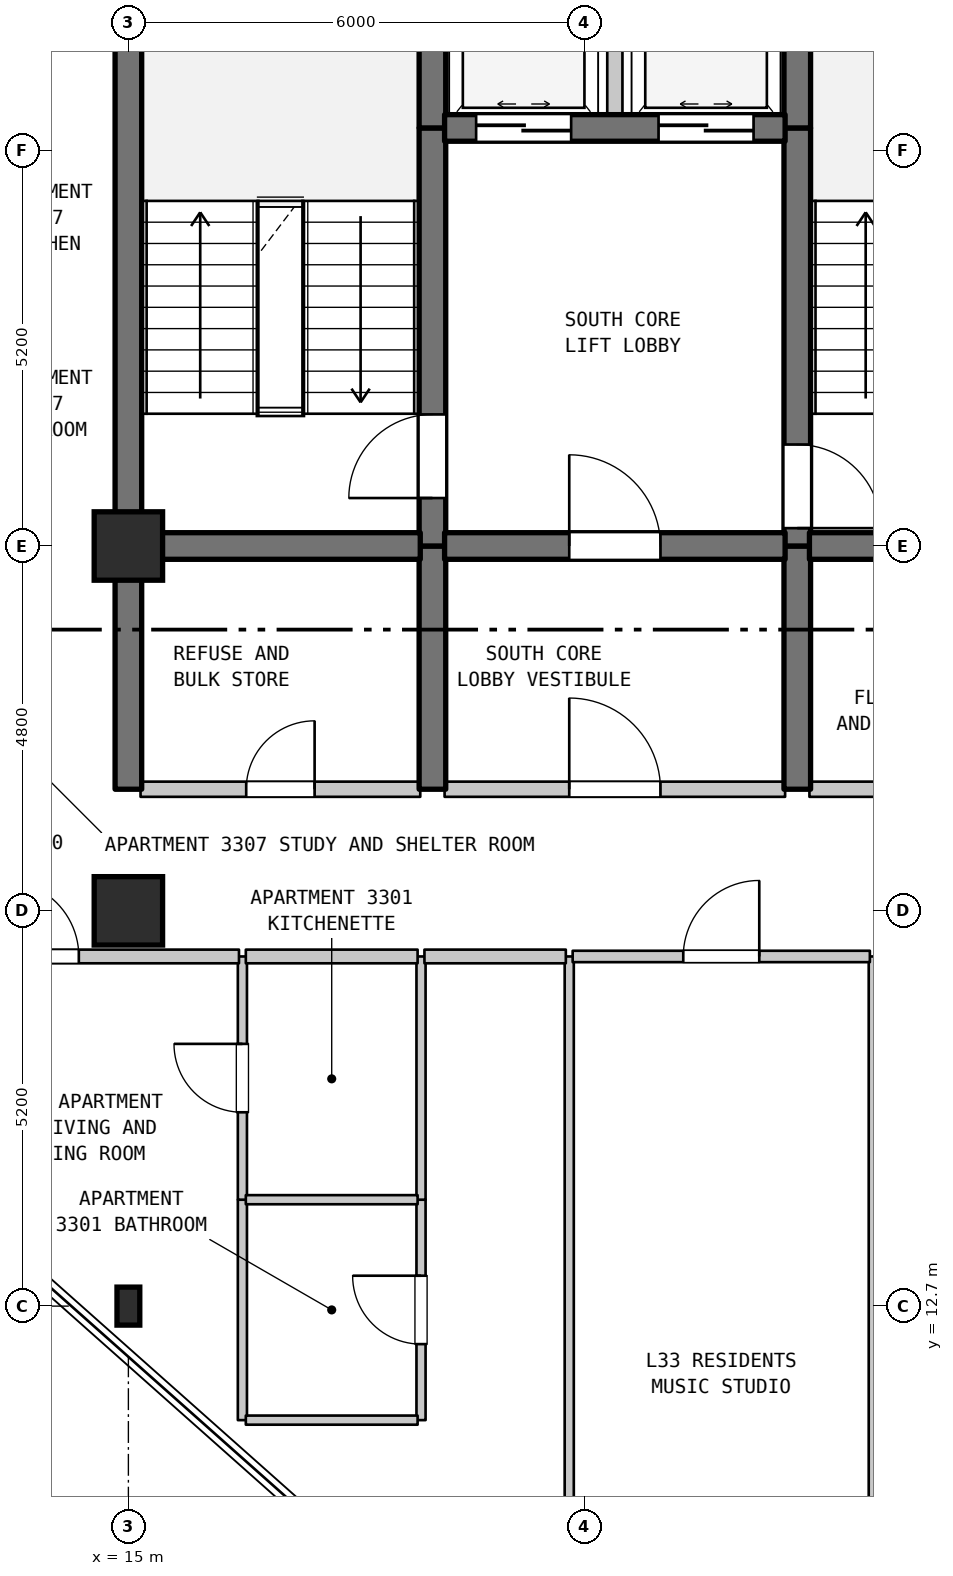
"""IFC4 building model, lengths in metres.
Left out: names, types, materials, properties, quantities, classifications, styles, units other than length and angle.
Written with IfcOpenShell. Run it as: python <this file> out.ifc"""

import sys

from ifc_helpers import new_model, si_unit, direction, frame, frame_2d, origin, origin_2d, place, context, subcontext, project, spatial, rectangle, i_section, extrude, element, fill, save


model = new_model("IFC4")
c1 = context("Model", 3, precision=1e-05, world=origin(), true_north=direction((0.0, 1.0)))
c2 = subcontext(c1, "Body", "Model", "MODEL_VIEW")
j1 = project(units=[si_unit("LENGTHUNIT", "METRE"), si_unit("PLANEANGLEUNIT", "RADIAN")], contexts=[c1])
p1 = place(None, origin())
s1 = spatial("IfcSite", under=j1, at=p1, CompositionType="ELEMENT")
p2 = place(p1, origin())
s2 = spatial("IfcBuilding", under=s1, at=p2, CompositionType="ELEMENT")
p3 = place(p2, frame((0.0, 0.0, 137.2)))
s3 = spatial("IfcBuildingStorey", under=s2, at=p3, CompositionType="ELEMENT", Elevation=137.2)
p4 = place(p3, frame((15.0, 12.7, 0.0), z_axis=(0.0, 0.0, 1.0), x_axis=(1.0, 0.0, 0.0)))
e1 = element("IfcColumn", 1, at=p4, inside=s3, PredefinedType="COLUMN", context=c2, shape_type="SweptSolid", body=[
    extrude(i_section(OverallWidth=0.3, OverallDepth=0.5, WebThickness=0.014, FlangeThickness=0.028, FilletRadius=0.027, at=origin_2d()), origin(), (0.0, 0.0, 1.0), 3.7),
])
for number, where, z_axis, x_axis in (
    (2, (15.0, 17.9, 0.0), (0.0, 0.0, 1.0), (1.0, 0.0, 0.0)),
    (3, (15.0, 22.7, 0.0), (0.0, 0.0, 1.0), (1.0, 0.0, 0.0)),
):
    element("IfcColumn", number, at=place(p3, frame(where, z_axis=z_axis, x_axis=x_axis)), inside=s3, PredefinedType="COLUMN", context=c2, shape_type="SweptSolid", body=[
        extrude(rectangle(XDim=0.9, YDim=0.9, at=origin_2d()), origin(), (0.0, 0.0, 1.0), 3.7),
    ])
p5 = place(p3, frame((15.0, 19.5, 0.0), z_axis=(0.0, 0.0, 1.0), x_axis=(0.0, 1.0, 0.0)))
e4 = element("IfcWall", 4, at=p5, inside=s3, PredefinedType="SHEAR", context=c2, shape_type="SweptSolid", body=[
    extrude(rectangle(XDim=3.2, YDim=0.35, at=frame_2d((1.6, 0.0))), origin(), (0.0, 0.0, 1.0), 3.385),
])
p6 = place(p3, frame((15.0, 22.7, 0.0), z_axis=(0.0, 0.0, 1.0), x_axis=(0.0, 1.0, 0.0)))
e5 = element("IfcWall", 5, at=p6, inside=s3, PredefinedType="SHEAR", context=c2, shape_type="SweptSolid", body=[
    extrude(rectangle(XDim=6.8, YDim=0.35, at=frame_2d((3.4, 0.0))), origin(), (0.0, 0.0, 1.0), 3.385),
])
p7 = place(p3, frame((16.5, 11.2, 0.0), z_axis=(0.0, 0.0, 1.0), x_axis=(0.0, 1.0, 0.0)))
e6 = element("IfcWall", 6, at=p7, inside=s3, PredefinedType="PARTITIONING", context=c2, shape_type="SweptSolid", body=[
    extrude(rectangle(XDim=2.9, YDim=0.12, at=frame_2d((1.45, 0.0))), origin(), (0.0, 0.0, 1.0), 3.385),
])
p8 = place(p3, frame((16.5, 14.1, 0.0), z_axis=(0.0, 0.0, 1.0), x_axis=(0.0, 1.0, 0.0)))
e7 = element("IfcWall", 7, at=p8, inside=s3, PredefinedType="PARTITIONING", context=c2, shape_type="SweptSolid", body=[
    extrude(rectangle(XDim=3.2, YDim=0.12, at=frame_2d((1.6, 0.0))), origin(), (0.0, 0.0, 1.0), 3.385),
])
p9 = place(p8, frame((1.15, 0.0, 0.0)))
e8 = element("IfcOpeningElement", 8, at=p9, cuts=e7, PredefinedType="OPENING", context=c2, shape_type="SweptSolid", body=[
    extrude(rectangle(XDim=0.9, YDim=2.15, at=frame_2d((0.45, 1.075))), frame((0.0, 0.07, 0.0), z_axis=(0.0, -1.0, 0.0), x_axis=(1.0, 0.0, 0.0)), (0.0, 0.0, 1.0), 0.14),
])
p10 = place(p3, frame((18.85, 11.2, 0.0), z_axis=(0.0, 0.0, 1.0), x_axis=(0.0, 1.0, 0.0)))
e9 = element("IfcWall", 9, at=p10, inside=s3, PredefinedType="PARTITIONING", context=c2, shape_type="SweptSolid", body=[
    extrude(rectangle(XDim=2.9, YDim=0.12, at=frame_2d((1.45, 0.0))), origin(), (0.0, 0.0, 1.0), 3.385),
])
p11 = place(p10, frame((1.0, 0.0, 0.0)))
e10 = element("IfcOpeningElement", 10, at=p11, cuts=e9, PredefinedType="OPENING", context=c2, shape_type="SweptSolid", body=[
    extrude(rectangle(XDim=0.9, YDim=2.1, at=frame_2d((0.45, 1.05))), frame((0.0, 0.07, 0.0), z_axis=(0.0, -1.0, 0.0), x_axis=(1.0, 0.0, 0.0)), (0.0, 0.0, 1.0), 0.14),
])
p12 = place(p3, frame((18.85, 14.1, 0.0), z_axis=(0.0, 0.0, 1.0), x_axis=(0.0, 1.0, 0.0)))
e11 = element("IfcWall", 11, at=p12, inside=s3, PredefinedType="PARTITIONING", context=c2, shape_type="SweptSolid", body=[
    extrude(rectangle(XDim=3.2, YDim=0.12, at=frame_2d((1.6, 0.0))), origin(), (0.0, 0.0, 1.0), 3.385),
])
p13 = place(p3, frame((19.0, 19.5, 0.0), z_axis=(0.0, 0.0, 1.0), x_axis=(0.0, 1.0, 0.0)))
e12 = element("IfcWall", 12, at=p13, inside=s3, PredefinedType="SHEAR", context=c2, shape_type="SweptSolid", body=[
    extrude(rectangle(XDim=3.2, YDim=0.35, at=frame_2d((1.6, 0.0))), origin(), (0.0, 0.0, 1.0), 3.385),
])
p14 = place(p3, frame((19.0, 22.7, 0.0), z_axis=(0.0, 0.0, 1.0), x_axis=(0.0, 1.0, 0.0)))
e13 = element("IfcWall", 13, at=p14, inside=s3, PredefinedType="SHEAR", context=c2, shape_type="SweptSolid", body=[
    extrude(rectangle(XDim=5.5, YDim=0.35, at=frame_2d((2.75, 0.0))), origin(), (0.0, 0.0, 1.0), 3.385),
])
p15 = place(p14, frame((0.631, 0.0, 0.0)))
e14 = element("IfcOpeningElement", 14, at=p15, cuts=e13, PredefinedType="OPENING", context=c2, shape_type="SweptSolid", body=[
    extrude(rectangle(XDim=1.1, YDim=2.15, at=frame_2d((0.55, 1.075))), frame((0.0, 0.185, 0.0), z_axis=(0.0, -1.0, 0.0), x_axis=(1.0, 0.0, 0.0)), (0.0, 0.0, 1.0), 0.37),
])
p16 = place(p3, frame((19.0, 28.2, 0.0), z_axis=(0.0, 0.0, 1.0), x_axis=(0.0, 1.0, 0.0)))
e15 = element("IfcWall", 15, at=p16, inside=s3, PredefinedType="SHEAR", context=c2, shape_type="SweptSolid", body=[
    extrude(rectangle(XDim=1.3, YDim=0.35, at=frame_2d((0.65, 0.0))), origin(), (0.0, 0.0, 1.0), 3.385),
])
p17 = place(p3, frame((20.8, 6.888, 0.0), z_axis=(0.0, 0.0, 1.0), x_axis=(0.0, 1.0, 0.0)))
e16 = element("IfcWall", 16, at=p17, inside=s3, PredefinedType="PARTITIONING", context=c2, shape_type="SweptSolid", body=[
    extrude(rectangle(XDim=10.412, YDim=0.12, at=frame_2d((5.206, 0.0))), origin(), (0.0, 0.0, 1.0), 3.385),
])
p18 = place(p3, frame((21.4, 28.2, 0.0), z_axis=(0.0, 0.0, 1.0), x_axis=(0.0, 1.0, 0.0)))
e17 = element("IfcWall", 17, at=p18, inside=s3, PredefinedType="STANDARD", context=c2, shape_type="SweptSolid", body=[
    extrude(rectangle(XDim=2.6, YDim=0.2, at=frame_2d((1.3, 0.0))), origin(), (0.0, 0.0, 1.0), 3.385),
])
p19 = place(p3, frame((23.8, 19.5, 0.0), z_axis=(0.0, 0.0, 1.0), x_axis=(0.0, 1.0, 0.0)))
e18 = element("IfcWall", 18, at=p19, inside=s3, PredefinedType="SHEAR", context=c2, shape_type="SweptSolid", body=[
    extrude(rectangle(XDim=3.2, YDim=0.35, at=frame_2d((1.6, 0.0))), origin(), (0.0, 0.0, 1.0), 3.385),
])
p20 = place(p3, frame((23.8, 22.7, 0.0), z_axis=(0.0, 0.0, 1.0), x_axis=(0.0, 1.0, 0.0)))
e19 = element("IfcWall", 19, at=p20, inside=s3, PredefinedType="SHEAR", context=c2, shape_type="SweptSolid", body=[
    extrude(rectangle(XDim=5.5, YDim=0.35, at=frame_2d((2.75, 0.0))), origin(), (0.0, 0.0, 1.0), 3.385),
])
p21 = place(p20, frame((0.235, 0.0, 0.0)))
e20 = element("IfcOpeningElement", 20, at=p21, cuts=e19, PredefinedType="OPENING", context=c2, shape_type="SweptSolid", body=[
    extrude(rectangle(XDim=1.1, YDim=2.15, at=frame_2d((0.55, 1.075))), frame((0.0, 0.185, 0.0), z_axis=(0.0, -1.0, 0.0), x_axis=(1.0, 0.0, 0.0)), (0.0, 0.0, 1.0), 0.37),
])
p22 = place(p3, frame((23.8, 28.2, 0.0), z_axis=(0.0, 0.0, 1.0), x_axis=(0.0, 1.0, 0.0)))
e21 = element("IfcWall", 21, at=p22, inside=s3, PredefinedType="SHEAR", context=c2, shape_type="SweptSolid", body=[
    extrude(rectangle(XDim=1.3, YDim=0.35, at=frame_2d((0.65, 0.0))), origin(), (0.0, 0.0, 1.0), 3.385),
])
p23 = place(p3, frame((24.8, 0.71, 0.0), z_axis=(0.0, 0.0, 1.0), x_axis=(0.0, 1.0, 0.0)))
e22 = element("IfcWall", 22, at=p23, inside=s3, PredefinedType="PARTITIONING", context=c2, shape_type="SweptSolid", body=[
    extrude(rectangle(XDim=16.59, YDim=0.12, at=frame_2d((8.295, 0.0))), origin(), (0.0, 0.0, 1.0), 3.385),
])
for number, where, z_axis, x_axis in (
    (23, (16.545, 11.2, 0.0), (0.0, 0.0, 1.0), (1.0, 0.0, 0.0)),
    (24, (16.545, 14.1, 0.0), (0.0, 0.0, 1.0), (1.0, 0.0, 0.0)),
):
    element("IfcWall", number, at=place(p3, frame(where, z_axis=z_axis, x_axis=x_axis)), inside=s3, PredefinedType="PARTITIONING", context=c2, shape_type="SweptSolid", body=[
        extrude(rectangle(XDim=2.26, YDim=0.12, at=frame_2d((1.13, 0.0))), origin(), (0.0, 0.0, 1.0), 3.385),
    ])
p24 = place(p3, frame((12.875, 17.3, 0.0), z_axis=(0.0, 0.0, 1.0), x_axis=(1.0, 0.0, 0.0)))
e25 = element("IfcWall", 25, at=p24, inside=s3, PredefinedType="STANDARD", context=c2, shape_type="SweptSolid", body=[
    extrude(rectangle(XDim=3.58, YDim=0.18, at=frame_2d((1.79, 0.0))), origin(), (0.0, 0.0, 1.0), 3.385),
])
p25 = place(p24, frame((0.473, 0.0, 0.0)))
e26 = element("IfcOpeningElement", 26, at=p25, cuts=e25, PredefinedType="OPENING", context=c2, shape_type="SweptSolid", body=[
    extrude(rectangle(XDim=1.0, YDim=2.15, at=frame_2d((0.5, 1.075))), frame((0.0, 0.1, 0.0), z_axis=(0.0, -1.0, 0.0), x_axis=(1.0, 0.0, 0.0)), (0.0, 0.0, 1.0), 0.2),
])
p26 = place(p3, frame((16.545, 17.3, 0.0), z_axis=(0.0, 0.0, 1.0), x_axis=(1.0, 0.0, 0.0)))
e27 = element("IfcWall", 27, at=p26, inside=s3, PredefinedType="STANDARD", context=c2, shape_type="SweptSolid", body=[
    extrude(rectangle(XDim=2.26, YDim=0.18, at=frame_2d((1.13, 0.0))), origin(), (0.0, 0.0, 1.0), 3.385),
])
p27 = place(p3, frame((18.895, 17.3, 0.0), z_axis=(0.0, 0.0, 1.0), x_axis=(1.0, 0.0, 0.0)))
e28 = element("IfcWall", 28, at=p27, inside=s3, PredefinedType="STANDARD", context=c2, shape_type="SweptSolid", body=[
    extrude(rectangle(XDim=1.86, YDim=0.18, at=frame_2d((0.93, 0.0))), origin(), (0.0, 0.0, 1.0), 3.385),
])
p28 = place(p3, frame((20.845, 17.3, 0.0), z_axis=(0.0, 0.0, 1.0), x_axis=(1.0, 0.0, 0.0)))
e29 = element("IfcWall", 29, at=p28, inside=s3, PredefinedType="STANDARD", context=c2, shape_type="SweptSolid", body=[
    extrude(rectangle(XDim=3.91, YDim=0.15, at=frame_2d((1.955, 0.0))), origin(), (0.0, 0.0, 1.0), 3.385),
])
p29 = place(p28, frame((1.455, 0.0, 0.0)))
e30 = element("IfcOpeningElement", 30, at=p29, cuts=e29, PredefinedType="OPENING", context=c2, shape_type="SweptSolid", body=[
    extrude(rectangle(XDim=1.0, YDim=2.15, at=frame_2d((0.5, 1.075))), frame((0.0, 0.085, 0.0), z_axis=(0.0, -1.0, 0.0), x_axis=(1.0, 0.0, 0.0)), (0.0, 0.0, 1.0), 0.17),
])
p30 = place(p3, frame((15.16, 19.5, 0.0), z_axis=(0.0, 0.0, 1.0), x_axis=(1.0, 0.0, 0.0)))
e31 = element("IfcWall", 31, at=p30, inside=s3, PredefinedType="STANDARD", context=c2, shape_type="SweptSolid", body=[
    extrude(rectangle(XDim=3.68, YDim=0.2, at=frame_2d((1.84, 0.0))), origin(), (0.0, 0.0, 1.0), 3.385),
])
p31 = place(p30, frame((1.39, 0.0, 0.0)))
e32 = element("IfcOpeningElement", 32, at=p31, cuts=e31, PredefinedType="OPENING", context=c2, shape_type="SweptSolid", body=[
    extrude(rectangle(XDim=0.9, YDim=2.15, at=frame_2d((0.45, 1.075))), frame((0.0, 0.11, 0.0), z_axis=(0.0, -1.0, 0.0), x_axis=(1.0, 0.0, 0.0)), (0.0, 0.0, 1.0), 0.22),
])
p32 = place(p3, frame((19.16, 19.5, 0.0), z_axis=(0.0, 0.0, 1.0), x_axis=(1.0, 0.0, 0.0)))
e33 = element("IfcWall", 33, at=p32, inside=s3, PredefinedType="STANDARD", context=c2, shape_type="SweptSolid", body=[
    extrude(rectangle(XDim=4.48, YDim=0.2, at=frame_2d((2.24, 0.0))), origin(), (0.0, 0.0, 1.0), 3.385),
])
p33 = place(p32, frame((1.64, 0.0, 0.0)))
e34 = element("IfcOpeningElement", 34, at=p33, cuts=e33, PredefinedType="OPENING", context=c2, shape_type="SweptSolid", body=[
    extrude(rectangle(XDim=1.2, YDim=2.2, at=frame_2d((0.6, 1.1))), frame((0.0, 0.11, 0.0), z_axis=(0.0, -1.0, 0.0), x_axis=(1.0, 0.0, 0.0)), (0.0, 0.0, 1.0), 0.22),
])
p34 = place(p3, frame((23.96, 19.5, 0.0), z_axis=(0.0, 0.0, 1.0), x_axis=(1.0, 0.0, 0.0)))
e35 = element("IfcWall", 35, at=p34, inside=s3, PredefinedType="STANDARD", context=c2, shape_type="SweptSolid", body=[
    extrude(rectangle(XDim=3.155, YDim=0.2, at=frame_2d((1.578, 0.0))), origin(), (0.0, 0.0, 1.0), 3.385),
])
p35 = place(p34, frame((0.991, 0.0, 0.0)))
e36 = element("IfcOpeningElement", 36, at=p35, cuts=e35, PredefinedType="OPENING", context=c2, shape_type="SweptSolid", body=[
    extrude(rectangle(XDim=0.95, YDim=2.15, at=frame_2d((0.475, 1.075))), frame((0.0, 0.11, 0.0), z_axis=(0.0, -1.0, 0.0), x_axis=(1.0, 0.0, 0.0)), (0.0, 0.0, 1.0), 0.22),
])
p36 = place(p3, frame((15.16, 22.7, 0.0), z_axis=(0.0, 0.0, 1.0), x_axis=(1.0, 0.0, 0.0)))
e37 = element("IfcWall", 37, at=p36, inside=s3, PredefinedType="SHEAR", context=c2, shape_type="SweptSolid", body=[
    extrude(rectangle(XDim=3.68, YDim=0.35, at=frame_2d((1.84, 0.0))), origin(), (0.0, 0.0, 1.0), 3.385),
])
p37 = place(p3, frame((19.16, 22.7, 0.0), z_axis=(0.0, 0.0, 1.0), x_axis=(1.0, 0.0, 0.0)))
e38 = element("IfcWall", 38, at=p37, inside=s3, PredefinedType="SHEAR", context=c2, shape_type="SweptSolid", body=[
    extrude(rectangle(XDim=4.48, YDim=0.35, at=frame_2d((2.24, 0.0))), origin(), (0.0, 0.0, 1.0), 3.385),
])
p38 = place(p37, frame((1.64, 0.0, 0.0)))
e39 = element("IfcOpeningElement", 39, at=p38, cuts=e38, PredefinedType="OPENING", context=c2, shape_type="SweptSolid", body=[
    extrude(rectangle(XDim=1.2, YDim=2.2, at=frame_2d((0.6, 1.1))), frame((0.0, 0.185, 0.0), z_axis=(0.0, -1.0, 0.0), x_axis=(1.0, 0.0, 0.0)), (0.0, 0.0, 1.0), 0.37),
])
p39 = place(p3, frame((23.96, 22.7, 0.0), z_axis=(0.0, 0.0, 1.0), x_axis=(1.0, 0.0, 0.0)))
e40 = element("IfcWall", 40, at=p39, inside=s3, PredefinedType="SHEAR", context=c2, shape_type="SweptSolid", body=[
    extrude(rectangle(XDim=3.155, YDim=0.35, at=frame_2d((1.578, 0.0))), origin(), (0.0, 0.0, 1.0), 3.385),
])
p40 = place(p3, frame((19.16, 28.2, 0.0), z_axis=(0.0, 0.0, 1.0), x_axis=(1.0, 0.0, 0.0)))
e41 = element("IfcWall", 41, at=p40, inside=s3, PredefinedType="SHEAR", context=c2, shape_type="SweptSolid", body=[
    extrude(rectangle(XDim=4.48, YDim=0.35, at=frame_2d((2.24, 0.0))), origin(), (0.0, 0.0, 1.0), 3.385),
])
p41 = place(p40, frame((0.415, 0.0, 0.0)))
e42 = element("IfcOpeningElement", 42, at=p41, cuts=e41, PredefinedType="OPENING", context=c2, shape_type="SweptSolid", body=[
    extrude(rectangle(XDim=1.25, YDim=2.2, at=frame_2d((0.625, 1.1))), frame((0.0, 0.185, 0.0), z_axis=(0.0, -1.0, 0.0), x_axis=(1.0, 0.0, 0.0)), (0.0, 0.0, 1.0), 0.37),
])
p42 = place(p40, frame((2.815, 0.0, 0.0)))
e43 = element("IfcOpeningElement", 43, at=p42, cuts=e41, PredefinedType="OPENING", context=c2, shape_type="SweptSolid", body=[
    extrude(rectangle(XDim=1.25, YDim=2.2, at=frame_2d((0.625, 1.1))), frame((0.0, 0.185, 0.0), z_axis=(0.0, -1.0, 0.0), x_axis=(1.0, 0.0, 0.0)), (0.0, 0.0, 1.0), 0.37),
])
p43 = place(p9, origin())
e44 = element("IfcDoor", 44, at=p43, inside=s3, OperationType="SINGLE_SWING_RIGHT", PredefinedType="DOOR", context=c2, shape_type="SweptSolid", body=[
    extrude(rectangle(XDim=0.9, YDim=2.15, at=frame_2d((0.45, 1.075))), frame((0.0, 0.025, 0.0), z_axis=(0.0, -1.0, 0.0), x_axis=(1.0, 0.0, 0.0)), (0.0, 0.0, 1.0), 0.05),
])
fill(e8, e44)
p44 = place(p11, origin())
e45 = element("IfcDoor", 45, at=p44, inside=s3, OperationType="SINGLE_SWING_RIGHT", PredefinedType="DOOR", context=c2, shape_type="SweptSolid", body=[
    extrude(rectangle(XDim=0.9, YDim=2.1, at=frame_2d((0.45, 1.05))), frame((0.0, 0.025, 0.0), z_axis=(0.0, -1.0, 0.0), x_axis=(1.0, 0.0, 0.0)), (0.0, 0.0, 1.0), 0.05),
])
fill(e10, e45)
p45 = place(p15, origin())
e46 = element("IfcDoor", 46, at=p45, inside=s3, OperationType="SINGLE_SWING_LEFT", PredefinedType="DOOR", context=c2, shape_type="SweptSolid", body=[
    extrude(rectangle(XDim=1.1, YDim=2.15, at=frame_2d((0.55, 1.075))), frame((0.0, 0.025, 0.0), z_axis=(0.0, -1.0, 0.0), x_axis=(1.0, 0.0, 0.0)), (0.0, 0.0, 1.0), 0.05),
])
fill(e14, e46)
p46 = place(p21, frame((1.1, 0.0, 0.0), z_axis=(0.0, 0.0, 1.0), x_axis=(-1.0, 0.0, 0.0)))
e47 = element("IfcDoor", 47, at=p46, inside=s3, OperationType="SINGLE_SWING_LEFT", PredefinedType="DOOR", context=c2, shape_type="SweptSolid", body=[
    extrude(rectangle(XDim=1.1, YDim=2.15, at=frame_2d((0.55, 1.075))), frame((0.0, 0.025, 0.0), z_axis=(0.0, -1.0, 0.0), x_axis=(1.0, 0.0, 0.0)), (0.0, 0.0, 1.0), 0.05),
])
fill(e20, e47)
p47 = place(p25, origin())
e48 = element("IfcDoor", 48, at=p47, inside=s3, OperationType="SINGLE_SWING_LEFT", PredefinedType="DOOR", context=c2, shape_type="SweptSolid", body=[
    extrude(rectangle(XDim=1.0, YDim=2.15, at=frame_2d((0.5, 1.075))), frame((0.0, 0.025, 0.0), z_axis=(0.0, -1.0, 0.0), x_axis=(1.0, 0.0, 0.0)), (0.0, 0.0, 1.0), 0.05),
])
fill(e26, e48)
p48 = place(p29, origin())
e49 = element("IfcDoor", 49, at=p48, inside=s3, OperationType="SINGLE_SWING_RIGHT", PredefinedType="DOOR", context=c2, shape_type="SweptSolid", body=[
    extrude(rectangle(XDim=1.0, YDim=2.15, at=frame_2d((0.5, 1.075))), frame((0.0, 0.025, 0.0), z_axis=(0.0, -1.0, 0.0), x_axis=(1.0, 0.0, 0.0)), (0.0, 0.0, 1.0), 0.05),
])
fill(e30, e49)
p49 = place(p31, origin())
e50 = element("IfcDoor", 50, at=p49, inside=s3, OperationType="SINGLE_SWING_RIGHT", PredefinedType="DOOR", context=c2, shape_type="SweptSolid", body=[
    extrude(rectangle(XDim=0.9, YDim=2.15, at=frame_2d((0.45, 1.075))), frame((0.0, 0.025, 0.0), z_axis=(0.0, -1.0, 0.0), x_axis=(1.0, 0.0, 0.0)), (0.0, 0.0, 1.0), 0.05),
])
fill(e32, e50)
p50 = place(p33, origin())
e51 = element("IfcDoor", 51, at=p50, inside=s3, OperationType="SINGLE_SWING_LEFT", PredefinedType="DOOR", context=c2, shape_type="SweptSolid", body=[
    extrude(rectangle(XDim=1.2, YDim=2.2, at=frame_2d((0.6, 1.1))), frame((0.0, 0.025, 0.0), z_axis=(0.0, -1.0, 0.0), x_axis=(1.0, 0.0, 0.0)), (0.0, 0.0, 1.0), 0.05),
])
fill(e34, e51)
p51 = place(p38, origin())
e52 = element("IfcDoor", 52, at=p51, inside=s3, OperationType="SINGLE_SWING_LEFT", PredefinedType="DOOR", context=c2, shape_type="SweptSolid", body=[
    extrude(rectangle(XDim=1.2, YDim=2.2, at=frame_2d((0.6, 1.1))), frame((0.0, 0.025, 0.0), z_axis=(0.0, -1.0, 0.0), x_axis=(1.0, 0.0, 0.0)), (0.0, 0.0, 1.0), 0.05),
])
fill(e39, e52)
p52 = place(p41, origin())
e53 = element("IfcDoor", 53, at=p52, inside=s3, OperationType="DOUBLE_DOOR_SLIDING", PredefinedType="DOOR", context=c2, shape_type="SweptSolid", body=[
    extrude(rectangle(XDim=1.25, YDim=2.2, at=frame_2d((0.625, 1.1))), frame((0.0, 0.025, 0.0), z_axis=(0.0, -1.0, 0.0), x_axis=(1.0, 0.0, 0.0)), (0.0, 0.0, 1.0), 0.05),
])
fill(e42, e53)
p53 = place(p42, origin())
e54 = element("IfcDoor", 54, at=p53, inside=s3, OperationType="DOUBLE_DOOR_SLIDING", PredefinedType="DOOR", context=c2, shape_type="SweptSolid", body=[
    extrude(rectangle(XDim=1.25, YDim=2.2, at=frame_2d((0.625, 1.1))), frame((0.0, 0.025, 0.0), z_axis=(0.0, -1.0, 0.0), x_axis=(1.0, 0.0, 0.0)), (0.0, 0.0, 1.0), 0.05),
])
fill(e43, e54)
save(model, sys.argv[1])
